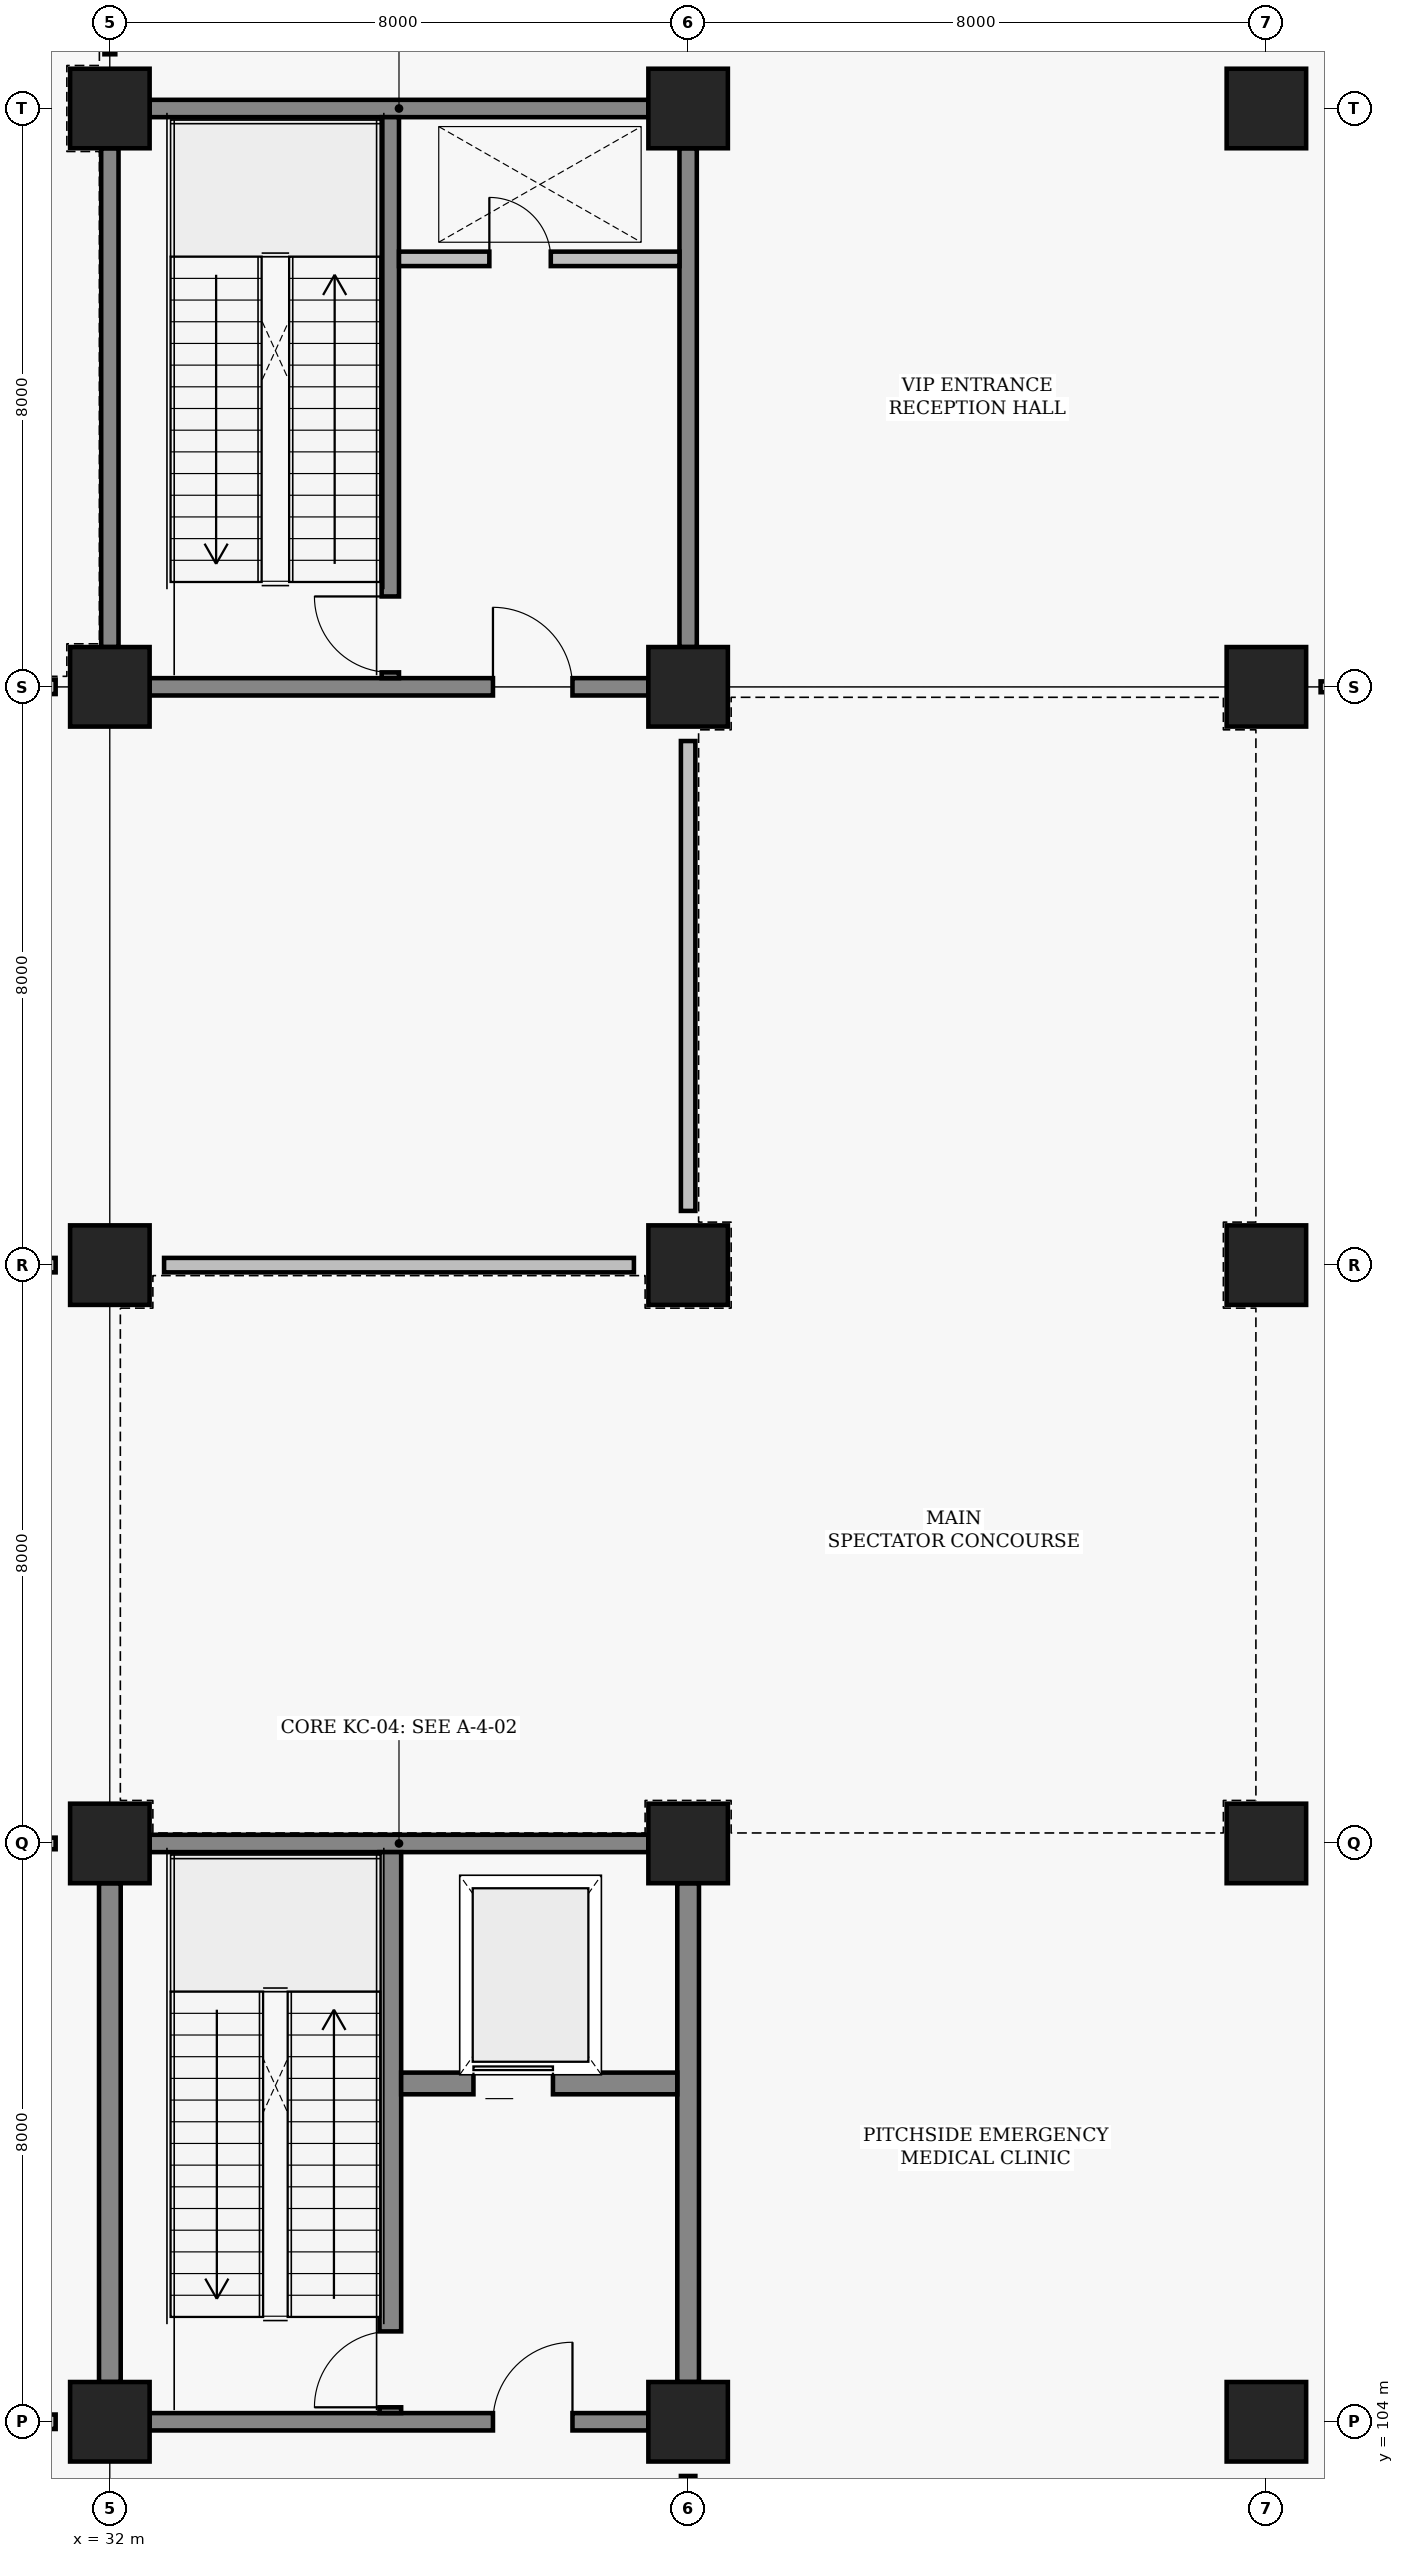
"""IFC4 building model, lengths in metres.
Left out: names, types, materials, properties, quantities, classifications, styles, units other than length and angle.
Written with IfcOpenShell. Run it as: python <this file> out.ifc"""

import sys

from ifc_helpers import new_model, si_unit, direction, frame, frame_2d, origin, origin_2d, place, context, subcontext, project, spatial, rectangle, extrude, element, fill, save


model = new_model("IFC4")
c1 = context("Model", 3, precision=1e-05, world=origin(), true_north=direction((0.0, 1.0)))
c2 = subcontext(c1, "Body", "Model", "MODEL_VIEW")
j1 = project(units=[si_unit("LENGTHUNIT", "METRE"), si_unit("PLANEANGLEUNIT", "RADIAN")], contexts=[c1])
p1 = place(None, origin())
s1 = spatial("IfcSite", under=j1, at=p1, CompositionType="ELEMENT")
p2 = place(p1, origin())
s2 = spatial("IfcBuilding", under=s1, at=p2, CompositionType="ELEMENT")
p3 = place(p2, origin())
s3 = spatial("IfcBuildingStorey", under=s2, at=p3, CompositionType="ELEMENT", Elevation=0.0)
for number, where, z_axis, x_axis in (
    (1, (32.0, 104.0, 0.0), (0.0, 0.0, 1.0), (1.0, 0.0, 0.0)),
    (2, (32.0, 112.0, 0.0), (0.0, 0.0, 1.0), (1.0, 0.0, 0.0)),
    (3, (32.0, 120.0, 0.0), (0.0, 0.0, 1.0), (1.0, 0.0, 0.0)),
    (4, (32.0, 128.0, 0.0), (0.0, 0.0, 1.0), (1.0, 0.0, 0.0)),
    (5, (32.0, 136.0, 0.0), (0.0, 0.0, 1.0), (1.0, 0.0, 0.0)),
    (6, (40.0, 104.0, 0.0), (0.0, 0.0, 1.0), (1.0, 0.0, 0.0)),
    (7, (40.0, 112.0, 0.0), (0.0, 0.0, 1.0), (1.0, 0.0, 0.0)),
    (8, (40.0, 120.0, 0.0), (0.0, 0.0, 1.0), (1.0, 0.0, 0.0)),
    (9, (40.0, 128.0, 0.0), (0.0, 0.0, 1.0), (1.0, 0.0, 0.0)),
    (10, (40.0, 136.0, 0.0), (0.0, 0.0, 1.0), (1.0, 0.0, 0.0)),
    (11, (48.0, 104.0, 0.0), (0.0, 0.0, 1.0), (1.0, 0.0, 0.0)),
    (12, (48.0, 112.0, 0.0), (0.0, 0.0, 1.0), (1.0, 0.0, 0.0)),
    (13, (48.0, 120.0, 0.0), (0.0, 0.0, 1.0), (1.0, 0.0, 0.0)),
    (14, (48.0, 128.0, 0.0), (0.0, 0.0, 1.0), (1.0, 0.0, 0.0)),
    (15, (48.0, 136.0, 0.0), (0.0, 0.0, 1.0), (1.0, 0.0, 0.0)),
):
    element("IfcColumn", number, at=place(p3, frame(where, z_axis=z_axis, x_axis=x_axis)), inside=s3, PredefinedType="COLUMN", context=c2, shape_type="SweptSolid", body=[
        extrude(rectangle(XDim=1.1, YDim=1.1, at=origin_2d()), origin(), (0.0, 0.0, 1.0), 4.8),
    ])
p4 = place(p3, frame((32.55, 104.0, 0.0), z_axis=(0.0, 0.0, 1.0), x_axis=(1.0, 0.0, 0.0)))
e16 = element("IfcWall", 16, at=p4, inside=s3, PredefinedType="SHEAR", context=c2, shape_type="SweptSolid", body=[
    extrude(rectangle(XDim=6.9, YDim=0.24, at=frame_2d((3.45, 0.0))), origin(), (0.0, 0.0, 1.0), 3.77),
])
p5 = place(p4, frame((4.75, 0.0, 0.0)))
e17 = element("IfcOpeningElement", 17, at=p5, cuts=e16, PredefinedType="OPENING", context=c2, shape_type="SweptSolid", body=[
    extrude(rectangle(XDim=1.1, YDim=2.2, at=frame_2d((0.55, 1.1))), frame((0.0, 0.13, 0.0), z_axis=(0.0, -1.0, 0.0), x_axis=(1.0, 0.0, 0.0)), (0.0, 0.0, 1.0), 0.26),
])
p6 = place(p3, frame((32.55, 112.0, 0.0), z_axis=(0.0, 0.0, 1.0), x_axis=(1.0, 0.0, 0.0)))
e18 = element("IfcWall", 18, at=p6, inside=s3, PredefinedType="SHEAR", context=c2, shape_type="SweptSolid", body=[
    extrude(rectangle(XDim=6.9, YDim=0.24, at=frame_2d((3.45, 0.0))), origin(), (0.0, 0.0, 1.0), 3.77),
])
for number, where, z_axis, x_axis in (
    (19, (32.0, 104.55, 0.0), (0.0, 0.0, 1.0), (0.0, 1.0, 0.0)),
    (20, (40.0, 104.55, 0.0), (0.0, 0.0, 1.0), (0.0, 1.0, 0.0)),
):
    element("IfcWall", number, at=place(p3, frame(where, z_axis=z_axis, x_axis=x_axis)), inside=s3, PredefinedType="SHEAR", context=c2, shape_type="SweptSolid", body=[
        extrude(rectangle(XDim=6.9, YDim=0.3, at=frame_2d((3.45, 0.0))), origin(), (0.0, 0.0, 1.0), 3.77),
    ])
p7 = place(p3, frame((35.88, 104.12, 0.0), z_axis=(0.0, 0.0, 1.0), x_axis=(0.0, 1.0, 0.0)))
e21 = element("IfcWall", 21, at=p7, inside=s3, PredefinedType="SHEAR", context=c2, shape_type="SweptSolid", body=[
    extrude(rectangle(XDim=7.76, YDim=0.3, at=frame_2d((3.88, 0.0))), origin(), (0.0, 0.0, 1.0), 3.97),
])
p8 = place(p7, frame((0.08, 0.0, 0.0)))
e22 = element("IfcOpeningElement", 22, at=p8, cuts=e21, PredefinedType="OPENING", context=c2, shape_type="SweptSolid", body=[
    extrude(rectangle(XDim=1.05, YDim=2.15, at=frame_2d((0.525, 1.075))), frame((0.0, 0.16, 0.0), z_axis=(0.0, -1.0, 0.0), x_axis=(1.0, 0.0, 0.0)), (0.0, 0.0, 1.0), 0.32),
])
p9 = place(p3, frame((36.03, 108.68, 0.0), z_axis=(0.0, 0.0, 1.0), x_axis=(1.0, 0.0, 0.0)))
e23 = element("IfcWall", 23, at=p9, inside=s3, PredefinedType="SHEAR", context=c2, shape_type="SweptSolid", body=[
    extrude(rectangle(XDim=3.82, YDim=0.3, at=frame_2d((1.91, 0.0))), origin(), (0.0, 0.0, 1.0), 3.77),
])
p10 = place(p9, frame((1.0, 0.0, 0.0)))
e24 = element("IfcOpeningElement", 24, at=p10, cuts=e23, PredefinedType="OPENING", context=c2, shape_type="SweptSolid", body=[
    extrude(rectangle(XDim=1.1, YDim=2.15, at=frame_2d((0.55, 1.075))), frame((0.0, 0.16, 0.0), z_axis=(0.0, -1.0, 0.0), x_axis=(1.0, 0.0, 0.0)), (0.0, 0.0, 1.0), 0.32),
])
p11 = place(p3, frame((32.55, 128.0, 0.0), z_axis=(0.0, 0.0, 1.0), x_axis=(1.0, 0.0, 0.0)))
e25 = element("IfcWall", 25, at=p11, inside=s3, PredefinedType="SHEAR", context=c2, shape_type="SweptSolid", body=[
    extrude(rectangle(XDim=6.9, YDim=0.24, at=frame_2d((3.45, 0.0))), origin(), (0.0, 0.0, 1.0), 3.77),
])
p12 = place(p11, frame((4.75, 0.0, 0.0)))
e26 = element("IfcOpeningElement", 26, at=p12, cuts=e25, PredefinedType="OPENING", context=c2, shape_type="SweptSolid", body=[
    extrude(rectangle(XDim=1.1, YDim=2.2, at=frame_2d((0.55, 1.1))), frame((0.0, 0.13, 0.0), z_axis=(0.0, -1.0, 0.0), x_axis=(1.0, 0.0, 0.0)), (0.0, 0.0, 1.0), 0.26),
])
for number, where, z_axis, x_axis in (
    (27, (32.55, 136.0, 0.0), (0.0, 0.0, 1.0), (1.0, 0.0, 0.0)),
    (28, (32.0, 128.55, 0.0), (0.0, 0.0, 1.0), (0.0, 1.0, 0.0)),
):
    element("IfcWall", number, at=place(p3, frame(where, z_axis=z_axis, x_axis=x_axis)), inside=s3, PredefinedType="SHEAR", context=c2, shape_type="SweptSolid", body=[
        extrude(rectangle(XDim=6.9, YDim=0.24, at=frame_2d((3.45, 0.0))), origin(), (0.0, 0.0, 1.0), 3.62),
    ])
p13 = place(p3, frame((40.0, 128.55, 0.0), z_axis=(0.0, 0.0, 1.0), x_axis=(0.0, 1.0, 0.0)))
e29 = element("IfcWall", 29, at=p13, inside=s3, PredefinedType="SHEAR", context=c2, shape_type="SweptSolid", body=[
    extrude(rectangle(XDim=6.9, YDim=0.24, at=frame_2d((3.45, 0.0))), origin(), (0.0, 0.0, 1.0), 3.77),
])
p14 = place(p3, frame((35.88, 128.12, 0.0), z_axis=(0.0, 0.0, 1.0), x_axis=(0.0, 1.0, 0.0)))
e30 = element("IfcWall", 30, at=p14, inside=s3, PredefinedType="SHEAR", context=c2, shape_type="SweptSolid", body=[
    extrude(rectangle(XDim=7.76, YDim=0.24, at=frame_2d((3.88, 0.0))), origin(), (0.0, 0.0, 1.0), 3.97),
])
p15 = place(p14, frame((0.08, 0.0, 0.0)))
e31 = element("IfcOpeningElement", 31, at=p15, cuts=e30, PredefinedType="OPENING", context=c2, shape_type="SweptSolid", body=[
    extrude(rectangle(XDim=1.05, YDim=2.15, at=frame_2d((0.525, 1.075))), frame((0.0, 0.13, 0.0), z_axis=(0.0, -1.0, 0.0), x_axis=(1.0, 0.0, 0.0)), (0.0, 0.0, 1.0), 0.26),
])
p16 = place(p3, frame((36.0, 133.92, 0.0), z_axis=(0.0, 0.0, 1.0), x_axis=(1.0, 0.0, 0.0)))
e32 = element("IfcWall", 32, at=p16, inside=s3, PredefinedType="PARTITIONING", context=c2, shape_type="SweptSolid", body=[
    extrude(rectangle(XDim=3.88, YDim=0.2, at=frame_2d((1.94, 0.0))), origin(), (0.0, 0.0, 1.0), 3.77),
])
p17 = place(p16, frame((1.25, 0.0, 0.0)))
e33 = element("IfcOpeningElement", 33, at=p17, cuts=e32, PredefinedType="OPENING", context=c2, shape_type="SweptSolid", body=[
    extrude(rectangle(XDim=0.85, YDim=2.05, at=frame_2d((0.425, 1.025))), frame((0.0, 0.11, 0.0), z_axis=(0.0, -1.0, 0.0), x_axis=(1.0, 0.0, 0.0)), (0.0, 0.0, 1.0), 0.22),
])
for number, where, z_axis, x_axis in (
    (34, (24.75, 120.0, 0.0), (0.0, 0.0, 1.0), (1.0, 0.0, 0.0)),
    (35, (24.75, 128.0, 0.0), (0.0, 0.0, 1.0), (1.0, 0.0, 0.0)),
):
    element("IfcWall", number, at=place(p3, frame(where, z_axis=z_axis, x_axis=x_axis)), inside=s3, PredefinedType="PARTITIONING", context=c2, shape_type="SweptSolid", body=[
        extrude(rectangle(XDim=6.5, YDim=0.2, at=frame_2d((3.25, 0.0))), origin(), (0.0, 0.0, 1.0), 3.87),
    ])
p18 = place(p3, frame((40.0, 120.75, 0.0), z_axis=(0.0, 0.0, 1.0), x_axis=(0.0, 1.0, 0.0)))
e36 = element("IfcWall", 36, at=p18, inside=s3, PredefinedType="PARTITIONING", context=c2, shape_type="SweptSolid", body=[
    extrude(rectangle(XDim=6.5, YDim=0.2, at=frame_2d((3.25, 0.0))), origin(), (0.0, 0.0, 1.0), 3.77),
])
for number, where, z_axis, x_axis in (
    (37, (32.75, 120.0, 0.0), (0.0, 0.0, 1.0), (1.0, 0.0, 0.0)),
    (38, (24.75, 104.0, 0.0), (0.0, 0.0, 1.0), (1.0, 0.0, 0.0)),
):
    element("IfcWall", number, at=place(p3, frame(where, z_axis=z_axis, x_axis=x_axis)), inside=s3, PredefinedType="PARTITIONING", context=c2, shape_type="SweptSolid", body=[
        extrude(rectangle(XDim=6.5, YDim=0.2, at=frame_2d((3.25, 0.0))), origin(), (0.0, 0.0, 1.0), 3.87),
    ])
p19 = place(p3, frame((40.0, 96.75, 0.0), z_axis=(0.0, 0.0, 1.0), x_axis=(0.0, 1.0, 0.0)))
e39 = element("IfcWall", 39, at=p19, inside=s3, PredefinedType="PARTITIONING", context=c2, shape_type="SweptSolid", body=[
    extrude(rectangle(XDim=6.5, YDim=0.2, at=frame_2d((3.25, 0.0))), origin(), (0.0, 0.0, 1.0), 3.77),
])
p20 = place(p3, frame((24.75, 112.0, 0.0), z_axis=(0.0, 0.0, 1.0), x_axis=(1.0, 0.0, 0.0)))
e40 = element("IfcWall", 40, at=p20, inside=s3, PredefinedType="PARTITIONING", context=c2, shape_type="SweptSolid", body=[
    extrude(rectangle(XDim=6.5, YDim=0.16, at=frame_2d((3.25, 0.0))), origin(), (0.0, 0.0, 1.0), 3.87),
])
p21 = place(p20, frame((2.775, 0.0, 0.0)))
e41 = element("IfcOpeningElement", 41, at=p21, cuts=e40, PredefinedType="OPENING", context=c2, shape_type="SweptSolid", body=[
    extrude(rectangle(XDim=0.95, YDim=2.1, at=frame_2d((0.475, 1.05))), frame((0.0, 0.09, 0.0), z_axis=(0.0, -1.0, 0.0), x_axis=(1.0, 0.0, 0.0)), (0.0, 0.0, 1.0), 0.18),
])
p22 = place(p3, frame((32.0, 136.75, 0.0), z_axis=(0.0, 0.0, 1.0), x_axis=(0.0, 1.0, 0.0)))
e42 = element("IfcWall", 42, at=p22, inside=s3, PredefinedType="PARTITIONING", context=c2, shape_type="SweptSolid", body=[
    extrude(rectangle(XDim=6.5, YDim=0.15, at=frame_2d((3.25, 0.0))), origin(), (0.0, 0.0, 1.0), 3.77),
])
p23 = place(p22, frame((2.35, 0.0, 0.0)))
e43 = element("IfcOpeningElement", 43, at=p23, cuts=e42, PredefinedType="OPENING", context=c2, shape_type="SweptSolid", body=[
    extrude(rectangle(XDim=1.8, YDim=2.3, at=frame_2d((0.9, 1.15))), frame((0.0, 0.085, 0.0), z_axis=(0.0, -1.0, 0.0), x_axis=(1.0, 0.0, 0.0)), (0.0, 0.0, 1.0), 0.17),
])
p24 = place(p3, frame((48.75, 128.0, 0.0), z_axis=(0.0, 0.0, 1.0), x_axis=(1.0, 0.0, 0.0)))
e44 = element("IfcWall", 44, at=p24, inside=s3, PredefinedType="PARTITIONING", context=c2, shape_type="SweptSolid", body=[
    extrude(rectangle(XDim=6.5, YDim=0.15, at=frame_2d((3.25, 0.0))), origin(), (0.0, 0.0, 1.0), 3.87),
])
p25 = place(p24, frame((2.35, 0.0, 0.0)))
e45 = element("IfcOpeningElement", 45, at=p25, cuts=e44, PredefinedType="OPENING", context=c2, shape_type="SweptSolid", body=[
    extrude(rectangle(XDim=1.8, YDim=2.3, at=frame_2d((0.9, 1.15))), frame((0.0, 0.085, 0.0), z_axis=(0.0, -1.0, 0.0), x_axis=(1.0, 0.0, 0.0)), (0.0, 0.0, 1.0), 0.17),
])
p26 = place(p5, origin())
e46 = element("IfcDoor", 46, at=p26, inside=s3, OperationType="SINGLE_SWING_RIGHT", PredefinedType="DOOR", context=c2, shape_type="SweptSolid", body=[
    extrude(rectangle(XDim=1.1, YDim=2.2, at=frame_2d((0.55, 1.1))), frame((0.0, 0.025, 0.0), z_axis=(0.0, -1.0, 0.0), x_axis=(1.0, 0.0, 0.0)), (0.0, 0.0, 1.0), 0.05),
])
fill(e17, e46)
p27 = place(p8, origin())
e47 = element("IfcDoor", 47, at=p27, inside=s3, OperationType="SINGLE_SWING_LEFT", PredefinedType="DOOR", context=c2, shape_type="SweptSolid", body=[
    extrude(rectangle(XDim=1.05, YDim=2.15, at=frame_2d((0.525, 1.075))), frame((0.0, 0.025, 0.0), z_axis=(0.0, -1.0, 0.0), x_axis=(1.0, 0.0, 0.0)), (0.0, 0.0, 1.0), 0.05),
])
fill(e22, e47)
p28 = place(p10, origin())
e48 = element("IfcDoor", 48, at=p28, inside=s3, OperationType="SLIDING_TO_LEFT", PredefinedType="DOOR", context=c2, shape_type="SweptSolid", body=[
    extrude(rectangle(XDim=1.1, YDim=2.15, at=frame_2d((0.55, 1.075))), frame((0.0, 0.025, 0.0), z_axis=(0.0, -1.0, 0.0), x_axis=(1.0, 0.0, 0.0)), (0.0, 0.0, 1.0), 0.05),
])
fill(e24, e48)
p29 = place(p12, origin())
e49 = element("IfcDoor", 49, at=p29, inside=s3, OperationType="SINGLE_SWING_LEFT", PredefinedType="DOOR", context=c2, shape_type="SweptSolid", body=[
    extrude(rectangle(XDim=1.1, YDim=2.2, at=frame_2d((0.55, 1.1))), frame((0.0, 0.025, 0.0), z_axis=(0.0, -1.0, 0.0), x_axis=(1.0, 0.0, 0.0)), (0.0, 0.0, 1.0), 0.05),
])
fill(e26, e49)
p30 = place(p15, origin())
e50 = element("IfcDoor", 50, at=p30, inside=s3, OperationType="SINGLE_SWING_RIGHT", PredefinedType="DOOR", context=c2, shape_type="SweptSolid", body=[
    extrude(rectangle(XDim=1.05, YDim=2.15, at=frame_2d((0.525, 1.075))), frame((0.0, 0.025, 0.0), z_axis=(0.0, -1.0, 0.0), x_axis=(1.0, 0.0, 0.0)), (0.0, 0.0, 1.0), 0.05),
])
fill(e31, e50)
p31 = place(p17, origin())
e51 = element("IfcDoor", 51, at=p31, inside=s3, OperationType="SINGLE_SWING_LEFT", PredefinedType="TRAPDOOR", context=c2, shape_type="SweptSolid", body=[
    extrude(rectangle(XDim=0.85, YDim=2.05, at=frame_2d((0.425, 1.025))), frame((0.0, 0.025, 0.0), z_axis=(0.0, -1.0, 0.0), x_axis=(1.0, 0.0, 0.0)), (0.0, 0.0, 1.0), 0.05),
])
fill(e33, e51)
save(model, sys.argv[1])
